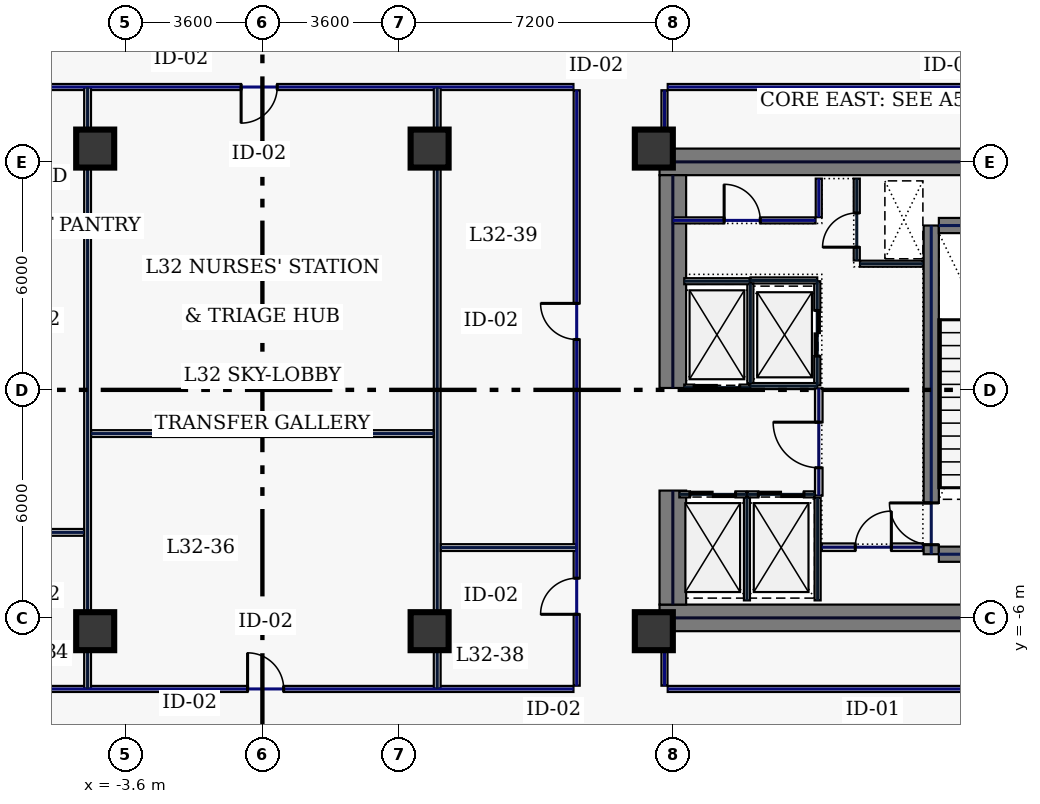
"""IFC4 building model, lengths in metres.
Left out: names, types, materials, properties, quantities, classifications, styles, units other than length and angle.
Written with IfcOpenShell. Run it as: python <this file> out.ifc"""

import sys

from ifc_helpers import new_model, si_unit, direction, frame, frame_2d, origin, origin_2d, place, context, subcontext, project, spatial, rectangle, hollow_rectangle, extrude, element, fill, save


model = new_model("IFC4")
c1 = context("Model", 3, precision=1e-05, world=origin(), true_north=direction((0.0, 1.0)))
c2 = subcontext(c1, "Body", "Model", "MODEL_VIEW")
j1 = project(units=[si_unit("LENGTHUNIT", "METRE"), si_unit("PLANEANGLEUNIT", "RADIAN")], contexts=[c1])
p1 = place(None, origin())
s1 = spatial("IfcSite", under=j1, at=p1, CompositionType="ELEMENT")
p2 = place(p1, origin())
s2 = spatial("IfcBuilding", under=s1, at=p2, CompositionType="ELEMENT")
p3 = place(p2, frame((0.0, 0.0, 141.4)))
s3 = spatial("IfcBuildingStorey", under=s2, at=p3, CompositionType="ELEMENT", Elevation=141.4)
for number, where, z_axis, x_axis in (
    (1, (10.45, 6.0, 0.0), (0.0, 0.0, 1.0), (1.0, 0.0, 0.0)),
    (2, (10.45, -6.0, 0.0), (0.0, 0.0, 1.0), (1.0, 0.0, 0.0)),
):
    element("IfcWall", number, at=place(p3, frame(where, z_axis=z_axis, x_axis=x_axis)), inside=s3, PredefinedType="SHEAR", context=c2, shape_type="SweptSolid", body=[
        extrude(rectangle(XDim=11.55, YDim=0.7, at=frame_2d((5.775, 0.0))), origin(), (0.0, 0.0, 1.0), 4.48),
    ])
p4 = place(p3, frame((10.8, -5.65, 0.0), z_axis=(0.0, 0.0, 1.0), x_axis=(0.0, 1.0, 0.0)))
e3 = element("IfcWall", 3, at=p4, inside=s3, PredefinedType="SHEAR", context=c2, shape_type="SweptSolid", body=[
    extrude(rectangle(XDim=3.0, YDim=0.7, at=frame_2d((1.5, 0.0))), origin(), (0.0, 0.0, 1.0), 4.48),
])
p5 = place(p3, frame((10.8, 0.05, 0.0), z_axis=(0.0, 0.0, 1.0), x_axis=(0.0, 1.0, 0.0)))
e4 = element("IfcWall", 4, at=p5, inside=s3, PredefinedType="SHEAR", context=c2, shape_type="SweptSolid", body=[
    extrude(rectangle(XDim=5.6, YDim=0.7, at=frame_2d((2.8, 0.0))), origin(), (0.0, 0.0, 1.0), 4.48),
])
p6 = place(p3, frame((17.6, -4.325, 0.0), z_axis=(0.0, 0.0, 1.0), x_axis=(0.0, 1.0, 0.0)))
e5 = element("IfcWall", 5, at=p6, inside=s3, PredefinedType="SHEAR", context=c2, shape_type="SweptSolid", body=[
    extrude(rectangle(XDim=8.65, YDim=0.4, at=frame_2d((4.325, 0.0))), origin(), (0.0, 0.0, 1.0), 4.48),
])
p7 = place(p6, frame((0.25, 0.0, 0.0)))
e6 = element("IfcOpeningElement", 6, at=p7, cuts=e5, PredefinedType="OPENING", context=c2, shape_type="SweptSolid", body=[
    extrude(rectangle(XDim=1.1, YDim=2.2, at=frame_2d((0.55, 1.1))), frame((0.0, 0.21, 0.0), z_axis=(0.0, -1.0, 0.0), x_axis=(1.0, 0.0, 0.0)), (0.0, 0.0, 1.0), 0.42),
])
for number, where, z_axis, x_axis in (
    (7, (17.8, -4.325, 0.0), (0.0, 0.0, 1.0), (1.0, 0.0, 0.0)),
    (8, (17.8, 4.325, 0.0), (0.0, 0.0, 1.0), (1.0, 0.0, 0.0)),
):
    element("IfcWall", number, at=place(p3, frame(where, z_axis=z_axis, x_axis=x_axis)), inside=s3, PredefinedType="SHEAR", context=c2, shape_type="SweptSolid", body=[
        extrude(rectangle(XDim=3.4, YDim=0.4, at=frame_2d((1.7, 0.0))), origin(), (0.0, 0.0, 1.0), 4.48),
    ])
for number, where, z_axis, x_axis in (
    (9, (10.3, -6.35, 0.0), (0.0, 0.0, 1.0), (1.0, 0.0, 0.0)),
    (10, (10.3, 6.35, 0.0), (0.0, 0.0, 1.0), (1.0, 0.0, 0.0)),
    (11, (-4.4, -6.35, 0.0), (0.0, 0.0, 1.0), (1.0, 0.0, 0.0)),
    (12, (4.4, -6.35, 0.0), (0.0, 0.0, 1.0), (1.0, 0.0, 0.0)),
    (13, (-4.4, 6.35, 0.0), (0.0, 0.0, 1.0), (1.0, 0.0, 0.0)),
    (14, (4.4, 6.35, 0.0), (0.0, 0.0, 1.0), (1.0, 0.0, 0.0)),
):
    element("IfcColumn", number, at=place(p3, frame(where, z_axis=z_axis, x_axis=x_axis)), inside=s3, PredefinedType="COLUMN", context=c2, shape_type="SweptSolid", body=[
        extrude(hollow_rectangle(XDim=1.0, YDim=1.0, WallThickness=0.045, at=origin_2d()), origin(), (0.0, 0.0, 1.0), 4.48),
    ])
p8 = place(p3, frame((14.6, 0.12, 0.0), z_axis=(0.0, 0.0, 1.0), x_axis=(0.0, 1.0, 0.0)))
e15 = element("IfcWall", 15, at=p8, inside=s3, PredefinedType="PARTITIONING", context=c2, shape_type="SweptSolid", body=[
    extrude(rectangle(XDim=2.74, YDim=0.16, at=frame_2d((1.37, 0.0))), origin(), (0.0, 0.0, 1.0), 4.48),
])
p9 = place(p8, frame((0.77, 0.0, 0.0)))
e16 = element("IfcOpeningElement", 16, at=p9, cuts=e15, PredefinedType="OPENING", context=c2, shape_type="SweptSolid", body=[
    extrude(rectangle(XDim=1.2, YDim=2.2, at=frame_2d((0.6, 1.1))), frame((0.0, 0.09, 0.0), z_axis=(0.0, -1.0, 0.0), x_axis=(1.0, 0.0, 0.0)), (0.0, 0.0, 1.0), 0.18),
])
for number, where, z_axis, x_axis in (
    (17, (12.84, 0.1, 0.0), (0.0, 0.0, 1.0), (1.0, 0.0, 0.0)),
    (18, (12.84, 2.88, 0.0), (0.0, 0.0, 1.0), (1.0, 0.0, 0.0)),
):
    element("IfcWall", number, at=place(p3, frame(where, z_axis=z_axis, x_axis=x_axis)), inside=s3, PredefinedType="PARTITIONING", context=c2, shape_type="SweptSolid", body=[
        extrude(rectangle(XDim=1.76, YDim=0.16, at=frame_2d((0.88, 0.0))), origin(), (0.0, 0.0, 1.0), 4.48),
    ])
p10 = place(p3, frame((12.84, 0.18, 0.0), z_axis=(0.0, 0.0, 1.0), x_axis=(0.0, 1.0, 0.0)))
e19 = element("IfcWall", 19, at=p10, inside=s3, PredefinedType="PARTITIONING", context=c2, shape_type="SweptSolid", body=[
    extrude(rectangle(XDim=2.62, YDim=0.16, at=frame_2d((1.31, 0.0))), origin(), (0.0, 0.0, 1.0), 4.48),
])
p11 = place(p3, frame((12.77, -2.75, 0.0), z_axis=(0.0, 0.0, 1.0), x_axis=(1.0, 0.0, 0.0)))
e20 = element("IfcWall", 20, at=p11, inside=s3, PredefinedType="PARTITIONING", context=c2, shape_type="SweptSolid", body=[
    extrude(rectangle(XDim=1.76, YDim=0.16, at=frame_2d((0.88, 0.0))), origin(), (0.0, 0.0, 1.0), 4.48),
])
p12 = place(p11, frame((0.28, 0.0, 0.0)))
e21 = element("IfcOpeningElement", 21, at=p12, cuts=e20, PredefinedType="OPENING", context=c2, shape_type="SweptSolid", body=[
    extrude(rectangle(XDim=1.2, YDim=2.2, at=frame_2d((0.6, 1.1))), frame((0.0, 0.09, 0.0), z_axis=(0.0, -1.0, 0.0), x_axis=(1.0, 0.0, 0.0)), (0.0, 0.0, 1.0), 0.18),
])
for number, where, z_axis, x_axis in (
    (22, (12.75, -5.54, 0.0), (0.0, 0.0, 1.0), (0.0, 1.0, 0.0)),
    (23, (14.61, -5.54, 0.0), (0.0, 0.0, 1.0), (0.0, 1.0, 0.0)),
):
    element("IfcWall", number, at=place(p3, frame(where, z_axis=z_axis, x_axis=x_axis)), inside=s3, PredefinedType="PARTITIONING", context=c2, shape_type="SweptSolid", body=[
        extrude(rectangle(XDim=2.7, YDim=0.16, at=frame_2d((1.35, 0.0))), origin(), (0.0, 0.0, 1.0), 4.48),
    ])
p13 = place(p3, frame((10.97, -2.75, 0.0), z_axis=(0.0, 0.0, 1.0), x_axis=(1.0, 0.0, 0.0)))
e24 = element("IfcWall", 24, at=p13, inside=s3, PredefinedType="PARTITIONING", context=c2, shape_type="SweptSolid", body=[
    extrude(rectangle(XDim=1.76, YDim=0.16, at=frame_2d((0.88, 0.0))), origin(), (0.0, 0.0, 1.0), 4.48),
])
p14 = place(p13, frame((0.28, 0.0, 0.0)))
e25 = element("IfcOpeningElement", 25, at=p14, cuts=e24, PredefinedType="OPENING", context=c2, shape_type="SweptSolid", body=[
    extrude(rectangle(XDim=1.2, YDim=2.2, at=frame_2d((0.6, 1.1))), frame((0.0, 0.09, 0.0), z_axis=(0.0, -1.0, 0.0), x_axis=(1.0, 0.0, 0.0)), (0.0, 0.0, 1.0), 0.18),
])
p15 = place(p3, frame((11.1, 0.06, 0.0), z_axis=(0.0, 0.0, 1.0), x_axis=(1.0, 0.0, 0.0)))
e26 = element("IfcWall", 26, at=p15, inside=s3, PredefinedType="PARTITIONING", context=c2, shape_type="SweptSolid", body=[
    extrude(rectangle(XDim=1.72, YDim=0.16, at=frame_2d((0.86, 0.0))), origin(), (0.0, 0.0, 1.0), 4.48),
])
p16 = place(p15, frame((0.26, 0.0, 0.0)))
e27 = element("IfcOpeningElement", 27, at=p16, cuts=e26, PredefinedType="OPENING", context=c2, shape_type="SweptSolid", body=[
    extrude(rectangle(XDim=1.2, YDim=2.2, at=frame_2d((0.6, 1.1))), frame((0.0, 0.09, 0.0), z_axis=(0.0, -1.0, 0.0), x_axis=(1.0, 0.0, 0.0)), (0.0, 0.0, 1.0), 0.18),
])
p17 = place(p3, frame((11.1, 2.86, 0.0), z_axis=(0.0, 0.0, 1.0), x_axis=(1.0, 0.0, 0.0)))
e28 = element("IfcWall", 28, at=p17, inside=s3, PredefinedType="PARTITIONING", context=c2, shape_type="SweptSolid", body=[
    extrude(rectangle(XDim=1.72, YDim=0.16, at=frame_2d((0.86, 0.0))), origin(), (0.0, 0.0, 1.0), 4.48),
])
p18 = place(p3, frame((15.64, 3.405, 0.0), z_axis=(0.0, 0.0, 1.0), x_axis=(0.0, 1.0, 0.0)))
e29 = element("IfcWall", 29, at=p18, inside=s3, PredefinedType="PARTITIONING", context=c2, shape_type="SweptSolid", body=[
    extrude(rectangle(XDim=2.155, YDim=0.16, at=frame_2d((1.078, 0.0))), origin(), (0.0, 0.0, 1.0), 4.48),
])
p19 = place(p18, frame((0.35, 0.0, 0.0)))
e30 = element("IfcOpeningElement", 30, at=p19, cuts=e29, PredefinedType="OPENING", context=c2, shape_type="SweptSolid", body=[
    extrude(rectangle(XDim=0.9, YDim=2.2, at=frame_2d((0.45, 1.1))), frame((0.0, 0.09, 0.0), z_axis=(0.0, -1.0, 0.0), x_axis=(1.0, 0.0, 0.0)), (0.0, 0.0, 1.0), 0.18),
])
p20 = place(p3, frame((15.725, 3.32, 0.0), z_axis=(0.0, 0.0, 1.0), x_axis=(1.0, 0.0, 0.0)))
e31 = element("IfcWall", 31, at=p20, inside=s3, PredefinedType="PARTITIONING", context=c2, shape_type="SweptSolid", body=[
    extrude(rectangle(XDim=1.655, YDim=0.16, at=frame_2d((0.827, 0.0))), origin(), (0.0, 0.0, 1.0), 4.48),
])
p21 = place(p3, frame((14.72, -4.14, 0.0), z_axis=(0.0, 0.0, 1.0), x_axis=(1.0, 0.0, 0.0)))
e32 = element("IfcWall", 32, at=p21, inside=s3, PredefinedType="SOLIDWALL", context=c2, shape_type="SweptSolid", body=[
    extrude(rectangle(XDim=2.66, YDim=0.2, at=frame_2d((1.33, 0.0))), origin(), (0.0, 0.0, 1.0), 4.48),
])
p22 = place(p21, frame((0.88, 0.0, 0.0)))
e33 = element("IfcOpeningElement", 33, at=p22, cuts=e32, PredefinedType="OPENING", context=c2, shape_type="SweptSolid", body=[
    extrude(rectangle(XDim=0.95, YDim=2.2, at=frame_2d((0.475, 1.1))), frame((0.0, 0.11, 0.0), z_axis=(0.0, -1.0, 0.0), x_axis=(1.0, 0.0, 0.0)), (0.0, 0.0, 1.0), 0.22),
])
p23 = place(p3, frame((10.8, 4.46, 0.0), z_axis=(0.0, 0.0, 1.0), x_axis=(1.0, 0.0, 0.0)))
e34 = element("IfcWall", 34, at=p23, inside=s3, PredefinedType="PARTITIONING", context=c2, shape_type="SweptSolid", body=[
    extrude(rectangle(XDim=3.755, YDim=0.16, at=frame_2d((1.877, 0.0))), origin(), (0.0, 0.0, 1.0), 4.48),
])
p24 = place(p23, frame((1.35, 0.0, 0.0)))
e35 = element("IfcOpeningElement", 35, at=p24, cuts=e34, PredefinedType="OPENING", context=c2, shape_type="SweptSolid", body=[
    extrude(rectangle(XDim=0.95, YDim=2.2, at=frame_2d((0.475, 1.1))), frame((0.0, 0.09, 0.0), z_axis=(0.0, -1.0, 0.0), x_axis=(1.0, 0.0, 0.0)), (0.0, 0.0, 1.0), 0.18),
])
p25 = place(p3, frame((14.64, 4.545, 0.0), z_axis=(0.0, 0.0, 1.0), x_axis=(0.0, 1.0, 0.0)))
e36 = element("IfcWall", 36, at=p25, inside=s3, PredefinedType="PARTITIONING", context=c2, shape_type="SweptSolid", body=[
    extrude(rectangle(XDim=1.015, YDim=0.16, at=frame_2d((0.508, 0.0))), origin(), (0.0, 0.0, 1.0), 4.48),
])
p26 = place(p3, frame((14.64, -2.78, 0.0), z_axis=(0.0, 0.0, 1.0), x_axis=(0.0, 1.0, 0.0)))
e37 = element("IfcWall", 37, at=p26, inside=s3, PredefinedType="SOLIDWALL", context=c2, shape_type="SweptSolid", body=[
    extrude(rectangle(XDim=2.82, YDim=0.2, at=frame_2d((1.41, 0.0))), origin(), (0.0, 0.0, 1.0), 4.48),
])
p27 = place(p26, frame((0.73, 0.0, 0.0)))
e38 = element("IfcOpeningElement", 38, at=p27, cuts=e37, PredefinedType="OPENING", context=c2, shape_type="SweptSolid", body=[
    extrude(rectangle(XDim=1.2, YDim=2.2, at=frame_2d((0.6, 1.1))), frame((0.0, 0.11, 0.0), z_axis=(0.0, -1.0, 0.0), x_axis=(1.0, 0.0, 0.0)), (0.0, 0.0, 1.0), 0.22),
])
p28 = place(p3, frame((25.235, 7.97, 0.0), z_axis=(0.0, 0.0, 1.0), x_axis=(-1.0, 0.0, 0.0)))
e39 = element("IfcWall", 39, at=p28, inside=s3, PredefinedType="PARTITIONING", context=c2, shape_type="SweptSolid", body=[
    extrude(rectangle(XDim=14.57, YDim=0.16, at=frame_2d((7.285, 0.0))), origin(), (0.0, 0.0, 1.0), 4.48),
])
p29 = place(p3, frame((10.58, 7.885, 0.0), z_axis=(0.0, 0.0, 1.0), x_axis=(0.0, -1.0, 0.0)))
e40 = element("IfcWall", 40, at=p29, inside=s3, PredefinedType="PARTITIONING", context=c2, shape_type="SweptSolid", body=[
    extrude(rectangle(XDim=1.465, YDim=0.16, at=frame_2d((0.732, 0.0))), origin(), (0.0, 0.0, 1.0), 2.275),
])
p30 = place(p3, frame((10.58, -6.42, 0.0), z_axis=(0.0, 0.0, 1.0), x_axis=(0.0, -1.0, 0.0)))
e41 = element("IfcWall", 41, at=p30, inside=s3, PredefinedType="PARTITIONING", context=c2, shape_type="SweptSolid", body=[
    extrude(rectangle(XDim=1.365, YDim=0.16, at=frame_2d((0.683, 0.0))), origin(), (0.0, 0.0, 1.0), 4.48),
])
p31 = place(p3, frame((10.665, -7.87, 0.0), z_axis=(0.0, 0.0, 1.0), x_axis=(1.0, 0.0, 0.0)))
e42 = element("IfcWall", 42, at=p31, inside=s3, PredefinedType="PARTITIONING", context=c2, shape_type="SweptSolid", body=[
    extrude(rectangle(XDim=14.57, YDim=0.16, at=frame_2d((7.285, 0.0))), origin(), (0.0, 0.0, 1.0), 4.48),
])
p32 = place(p3, frame((8.27, -7.785, 0.0), z_axis=(0.0, 0.0, 1.0), x_axis=(0.0, 1.0, 0.0)))
e43 = element("IfcWall", 43, at=p32, inside=s3, PredefinedType="PARTITIONING", context=c2, shape_type="SweptSolid", body=[
    extrude(rectangle(XDim=15.67, YDim=0.16, at=frame_2d((7.835, 0.0))), origin(), (0.0, 0.0, 1.0), 4.48),
])
p33 = place(p32, frame((1.879, 0.0, 0.0)))
e44 = element("IfcOpeningElement", 44, at=p33, cuts=e43, PredefinedType="OPENING", context=c2, shape_type="SweptSolid", body=[
    extrude(rectangle(XDim=0.95, YDim=2.2, at=frame_2d((0.475, 1.1))), frame((0.0, 0.09, 0.0), z_axis=(0.0, -1.0, 0.0), x_axis=(1.0, 0.0, 0.0)), (0.0, 0.0, 1.0), 0.18),
])
p34 = place(p32, frame((9.111, 0.0, 0.0)))
e45 = element("IfcOpeningElement", 45, at=p34, cuts=e43, PredefinedType="OPENING", context=c2, shape_type="SweptSolid", body=[
    extrude(rectangle(XDim=0.95, YDim=2.2, at=frame_2d((0.475, 1.1))), frame((0.0, 0.09, 0.0), z_axis=(0.0, -1.0, 0.0), x_axis=(1.0, 0.0, 0.0)), (0.0, 0.0, 1.0), 0.18),
])
p35 = place(p3, frame((8.185, 7.97, 0.0), z_axis=(0.0, 0.0, 1.0), x_axis=(-1.0, 0.0, 0.0)))
e46 = element("IfcWall", 46, at=p35, inside=s3, PredefinedType="PARTITIONING", context=c2, shape_type="SweptSolid", body=[
    extrude(rectangle(XDim=16.37, YDim=0.16, at=frame_2d((8.185, 0.0))), origin(), (0.0, 0.0, 1.0), 4.48),
])
p36 = place(p35, frame((7.795, 0.0, 0.0)))
e47 = element("IfcOpeningElement", 47, at=p36, cuts=e46, PredefinedType="OPENING", context=c2, shape_type="SweptSolid", body=[
    extrude(rectangle(XDim=0.95, YDim=2.2, at=frame_2d((0.475, 1.1))), frame((0.0, 0.09, 0.0), z_axis=(0.0, -1.0, 0.0), x_axis=(1.0, 0.0, 0.0)), (0.0, 0.0, 1.0), 0.18),
])
p37 = place(p3, frame((-8.185, -7.87, 0.0), z_axis=(0.0, 0.0, 1.0), x_axis=(1.0, 0.0, 0.0)))
e48 = element("IfcWall", 48, at=p37, inside=s3, PredefinedType="PARTITIONING", context=c2, shape_type="SweptSolid", body=[
    extrude(rectangle(XDim=16.37, YDim=0.16, at=frame_2d((8.185, 0.0))), origin(), (0.0, 0.0, 1.0), 4.48),
])
p38 = place(p37, frame((7.795, 0.0, 0.0)))
e49 = element("IfcOpeningElement", 49, at=p38, cuts=e48, PredefinedType="OPENING", context=c2, shape_type="SweptSolid", body=[
    extrude(rectangle(XDim=0.95, YDim=2.2, at=frame_2d((0.475, 1.1))), frame((0.0, 0.09, 0.0), z_axis=(0.0, -1.0, 0.0), x_axis=(1.0, 0.0, 0.0)), (0.0, 0.0, 1.0), 0.18),
])
for number, where, z_axis, x_axis in (
    (50, (-4.6, -7.865, 0.0), (0.0, 0.0, 1.0), (0.0, 1.0, 0.0)),
    (51, (4.6, -7.865, 0.0), (0.0, 0.0, 1.0), (0.0, 1.0, 0.0)),
):
    element("IfcWall", number, at=place(p3, frame(where, z_axis=z_axis, x_axis=x_axis)), inside=s3, PredefinedType="PARTITIONING", context=c2, shape_type="SweptSolid", body=[
        extrude(rectangle(XDim=15.83, YDim=0.18, at=frame_2d((7.915, 0.0))), origin(), (0.0, 0.0, 1.0), 2.275),
    ])
p39 = place(p3, frame((-4.505, -1.15, 0.0), z_axis=(0.0, 0.0, 1.0), x_axis=(1.0, 0.0, 0.0)))
e52 = element("IfcWall", 52, at=p39, inside=s3, PredefinedType="PARTITIONING", context=c2, shape_type="SweptSolid", body=[
    extrude(rectangle(XDim=9.01, YDim=0.18, at=frame_2d((4.505, 0.0))), origin(), (0.0, 0.0, 1.0), 4.48),
])
for number, where, z_axis, x_axis in (
    (53, (-8.265, -3.75, 0.0), (0.0, 0.0, 1.0), (1.0, 0.0, 0.0)),
    (54, (4.695, -4.15, 0.0), (0.0, 0.0, 1.0), (1.0, 0.0, 0.0)),
):
    element("IfcWall", number, at=place(p3, frame(where, z_axis=z_axis, x_axis=x_axis)), inside=s3, PredefinedType="PARTITIONING", context=c2, shape_type="SweptSolid", body=[
        extrude(rectangle(XDim=3.57, YDim=0.18, at=frame_2d((1.785, 0.0))), origin(), (0.0, 0.0, 1.0), 4.48),
    ])
p40 = place(p7, origin())
e55 = element("IfcDoor", 55, at=p40, inside=s3, OperationType="SINGLE_SWING_RIGHT", PredefinedType="DOOR", context=c2, shape_type="SweptSolid", body=[
    extrude(rectangle(XDim=1.1, YDim=2.2, at=frame_2d((0.55, 1.1))), frame((0.0, 0.025, 0.0), z_axis=(0.0, -1.0, 0.0), x_axis=(1.0, 0.0, 0.0)), (0.0, 0.0, 1.0), 0.05),
])
fill(e6, e55)
p41 = place(p9, origin())
e56 = element("IfcDoor", 56, at=p41, inside=s3, OperationType="SLIDING_TO_LEFT", PredefinedType="DOOR", context=c2, shape_type="SweptSolid", body=[
    extrude(rectangle(XDim=1.2, YDim=2.2, at=frame_2d((0.6, 1.1))), frame((0.0, 0.025, 0.0), z_axis=(0.0, -1.0, 0.0), x_axis=(1.0, 0.0, 0.0)), (0.0, 0.0, 1.0), 0.05),
])
fill(e16, e56)
p42 = place(p12, origin())
e57 = element("IfcDoor", 57, at=p42, inside=s3, OperationType="SLIDING_TO_LEFT", PredefinedType="DOOR", context=c2, shape_type="SweptSolid", body=[
    extrude(rectangle(XDim=1.2, YDim=2.2, at=frame_2d((0.6, 1.1))), frame((0.0, 0.025, 0.0), z_axis=(0.0, -1.0, 0.0), x_axis=(1.0, 0.0, 0.0)), (0.0, 0.0, 1.0), 0.05),
])
fill(e21, e57)
p43 = place(p14, origin())
e58 = element("IfcDoor", 58, at=p43, inside=s3, OperationType="SLIDING_TO_LEFT", PredefinedType="DOOR", context=c2, shape_type="SweptSolid", body=[
    extrude(rectangle(XDim=1.2, YDim=2.2, at=frame_2d((0.6, 1.1))), frame((0.0, 0.025, 0.0), z_axis=(0.0, -1.0, 0.0), x_axis=(1.0, 0.0, 0.0)), (0.0, 0.0, 1.0), 0.05),
])
fill(e25, e58)
p44 = place(p16, origin())
e59 = element("IfcDoor", 59, at=p44, inside=s3, OperationType="SLIDING_TO_LEFT", PredefinedType="DOOR", context=c2, shape_type="SweptSolid", body=[
    extrude(rectangle(XDim=1.2, YDim=2.2, at=frame_2d((0.6, 1.1))), frame((0.0, 0.025, 0.0), z_axis=(0.0, -1.0, 0.0), x_axis=(1.0, 0.0, 0.0)), (0.0, 0.0, 1.0), 0.05),
])
fill(e27, e59)
p45 = place(p19, origin())
e60 = element("IfcDoor", 60, at=p45, inside=s3, OperationType="SINGLE_SWING_LEFT", PredefinedType="DOOR", context=c2, shape_type="SweptSolid", body=[
    extrude(rectangle(XDim=0.9, YDim=2.2, at=frame_2d((0.45, 1.1))), frame((0.0, 0.025, 0.0), z_axis=(0.0, -1.0, 0.0), x_axis=(1.0, 0.0, 0.0)), (0.0, 0.0, 1.0), 0.05),
])
fill(e30, e60)
p46 = place(p22, origin())
e61 = element("IfcDoor", 61, at=p46, inside=s3, OperationType="SINGLE_SWING_RIGHT", PredefinedType="DOOR", context=c2, shape_type="SweptSolid", body=[
    extrude(rectangle(XDim=0.95, YDim=2.2, at=frame_2d((0.475, 1.1))), frame((0.0, 0.025, 0.0), z_axis=(0.0, -1.0, 0.0), x_axis=(1.0, 0.0, 0.0)), (0.0, 0.0, 1.0), 0.05),
])
fill(e33, e61)
p47 = place(p24, origin())
e62 = element("IfcDoor", 62, at=p47, inside=s3, OperationType="SINGLE_SWING_LEFT", PredefinedType="DOOR", context=c2, shape_type="SweptSolid", body=[
    extrude(rectangle(XDim=0.95, YDim=2.2, at=frame_2d((0.475, 1.1))), frame((0.0, 0.025, 0.0), z_axis=(0.0, -1.0, 0.0), x_axis=(1.0, 0.0, 0.0)), (0.0, 0.0, 1.0), 0.05),
])
fill(e35, e62)
p48 = place(p27, origin())
e63 = element("IfcDoor", 63, at=p48, inside=s3, OperationType="SINGLE_SWING_RIGHT", PredefinedType="DOOR", context=c2, shape_type="SweptSolid", body=[
    extrude(rectangle(XDim=1.2, YDim=2.2, at=frame_2d((0.6, 1.1))), frame((0.0, 0.025, 0.0), z_axis=(0.0, -1.0, 0.0), x_axis=(1.0, 0.0, 0.0)), (0.0, 0.0, 1.0), 0.05),
])
fill(e38, e63)
p49 = place(p38, origin())
e64 = element("IfcDoor", 64, at=p49, inside=s3, OperationType="SINGLE_SWING_LEFT", PredefinedType="DOOR", context=c2, shape_type="SweptSolid", body=[
    extrude(rectangle(XDim=0.95, YDim=2.2, at=frame_2d((0.475, 1.1))), frame((0.0, 0.025, 0.0), z_axis=(0.0, -1.0, 0.0), x_axis=(1.0, 0.0, 0.0)), (0.0, 0.0, 1.0), 0.05),
])
fill(e49, e64)
p50 = place(p36, origin())
e65 = element("IfcDoor", 65, at=p50, inside=s3, OperationType="SINGLE_SWING_RIGHT", PredefinedType="DOOR", context=c2, shape_type="SweptSolid", body=[
    extrude(rectangle(XDim=0.95, YDim=2.2, at=frame_2d((0.475, 1.1))), frame((0.0, 0.025, 0.0), z_axis=(0.0, -1.0, 0.0), x_axis=(1.0, 0.0, 0.0)), (0.0, 0.0, 1.0), 0.05),
])
fill(e47, e65)
p51 = place(p33, origin())
e66 = element("IfcDoor", 66, at=p51, inside=s3, OperationType="SINGLE_SWING_LEFT", PredefinedType="DOOR", context=c2, shape_type="SweptSolid", body=[
    extrude(rectangle(XDim=0.95, YDim=2.2, at=frame_2d((0.475, 1.1))), frame((0.0, 0.025, 0.0), z_axis=(0.0, -1.0, 0.0), x_axis=(1.0, 0.0, 0.0)), (0.0, 0.0, 1.0), 0.05),
])
fill(e44, e66)
p52 = place(p34, origin())
e67 = element("IfcDoor", 67, at=p52, inside=s3, OperationType="SINGLE_SWING_RIGHT", PredefinedType="DOOR", context=c2, shape_type="SweptSolid", body=[
    extrude(rectangle(XDim=0.95, YDim=2.2, at=frame_2d((0.475, 1.1))), frame((0.0, 0.025, 0.0), z_axis=(0.0, -1.0, 0.0), x_axis=(1.0, 0.0, 0.0)), (0.0, 0.0, 1.0), 0.05),
])
fill(e45, e67)
save(model, sys.argv[1])
